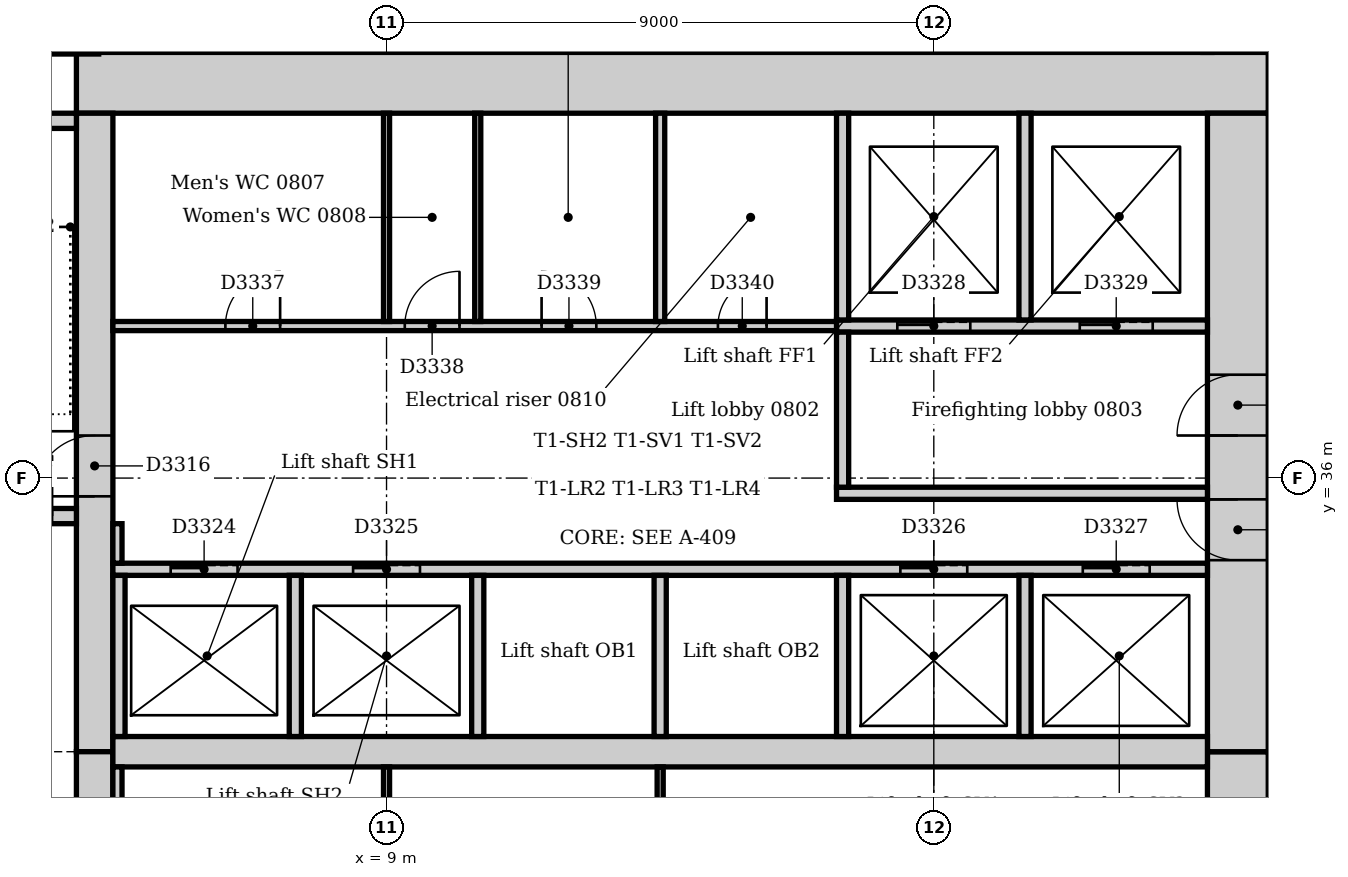
"""IFC4 building model, lengths in metres.
Left out: names, types, materials, properties, quantities, classifications, styles, units other than length and angle.
Written with IfcOpenShell. Run it as: python <this file> out.ifc"""

import sys

from ifc_helpers import new_model, si_unit, direction, frame, frame_2d, origin, origin_2d, place, context, subcontext, project, spatial, rectangle, extrude, element, fill, save


model = new_model("IFC4")
c1 = context("Model", 3, precision=1e-05, world=origin(), true_north=direction((0.0, 1.0)))
c2 = subcontext(c1, "Body", "Model", "MODEL_VIEW")
j1 = project(units=[si_unit("LENGTHUNIT", "METRE"), si_unit("PLANEANGLEUNIT", "RADIAN")], contexts=[c1])
p1 = place(None, origin())
s1 = spatial("IfcSite", under=j1, at=p1, CompositionType="ELEMENT")
p2 = place(p1, origin())
s2 = spatial("IfcBuilding", under=s1, at=p2, CompositionType="ELEMENT")
p3 = place(p2, frame((0.0, 0.0, 38.0)))
s3 = spatial("IfcBuildingStorey", under=s2, at=p3, CompositionType="ELEMENT", Elevation=38.0)
p4 = place(p3, frame((23.5, 42.5, 0.0), z_axis=(0.0, 0.0, 1.0), x_axis=(-1.0, 0.0, 0.0)))
e1 = element("IfcWall", 1, at=p4, inside=s3, PredefinedType="SOLIDWALL", context=c2, shape_type="SweptSolid", body=[
    extrude(rectangle(XDim=19.6, YDim=1.0, at=frame_2d((9.8, 0.0))), origin(), (0.0, 0.0, 1.0), 4.0),
])
p5 = place(p3, frame((23.0, 21.0, 0.0), z_axis=(0.0, 0.0, 1.0), x_axis=(0.0, 1.0, 0.0)))
e2 = element("IfcWall", 2, at=p5, inside=s3, PredefinedType="SOLIDWALL", context=c2, shape_type="SweptSolid", body=[
    extrude(rectangle(XDim=10.5, YDim=1.0, at=frame_2d((5.25, 0.0))), origin(), (0.0, 0.0, 1.0), 4.0),
])
p6 = place(p5, frame((4.35, 0.0, 0.0)))
e3 = element("IfcOpeningElement", 3, at=p6, cuts=e2, PredefinedType="OPENING", context=c2, shape_type="SweptSolid", body=[
    extrude(rectangle(XDim=1.8, YDim=2.1, at=frame_2d((0.9, 1.05))), frame((0.0, 0.51, 0.0), z_axis=(0.0, -1.0, 0.0), x_axis=(1.0, 0.0, 0.0)), (0.0, 0.0, 1.0), 1.02),
])
p7 = place(p3, frame((23.0, 31.5, 0.0), z_axis=(0.0, 0.0, 1.0), x_axis=(0.0, 1.0, 0.0)))
e4 = element("IfcWall", 4, at=p7, inside=s3, PredefinedType="SOLIDWALL", context=c2, shape_type="SweptSolid", body=[
    extrude(rectangle(XDim=10.5, YDim=1.0, at=frame_2d((5.25, 0.0))), origin(), (0.0, 0.0, 1.0), 4.0),
])
p8 = place(p7, frame((3.15, 0.0, 0.0)))
e5 = element("IfcOpeningElement", 5, at=p8, cuts=e4, PredefinedType="OPENING", context=c2, shape_type="SweptSolid", body=[
    extrude(rectangle(XDim=1.0, YDim=2.1, at=frame_2d((0.5, 1.05))), frame((0.0, 0.51, 0.0), z_axis=(0.0, -1.0, 0.0), x_axis=(1.0, 0.0, 0.0)), (0.0, 0.0, 1.0), 1.02),
])
p9 = place(p7, frame((5.2, 0.0, 0.0)))
e6 = element("IfcOpeningElement", 6, at=p9, cuts=e4, PredefinedType="OPENING", context=c2, shape_type="SweptSolid", body=[
    extrude(rectangle(XDim=1.0, YDim=2.1, at=frame_2d((0.5, 1.05))), frame((0.0, 0.51, 0.0), z_axis=(0.0, -1.0, 0.0), x_axis=(1.0, 0.0, 0.0)), (0.0, 0.0, 1.0), 1.02),
])
p10 = place(p3, frame((4.2, 42.0, 0.0), z_axis=(0.0, 0.0, 1.0), x_axis=(0.0, -1.0, 0.0)))
e7 = element("IfcWall", 7, at=p10, inside=s3, PredefinedType="SOLIDWALL", context=c2, shape_type="SweptSolid", body=[
    extrude(rectangle(XDim=10.5, YDim=0.6, at=frame_2d((5.25, 0.0))), origin(), (0.0, 0.0, 1.0), 4.0),
])
p11 = place(p10, frame((5.3, 0.0, 0.0)))
e8 = element("IfcOpeningElement", 8, at=p11, cuts=e7, PredefinedType="OPENING", context=c2, shape_type="SweptSolid", body=[
    extrude(rectangle(XDim=1.0, YDim=2.1, at=frame_2d((0.5, 1.05))), frame((0.0, 0.31, 0.0), z_axis=(0.0, -1.0, 0.0), x_axis=(1.0, 0.0, 0.0)), (0.0, 0.0, 1.0), 0.62),
])
p12 = place(p3, frame((4.2, 31.5, 0.0), z_axis=(0.0, 0.0, 1.0), x_axis=(0.0, -1.0, 0.0)))
e9 = element("IfcWall", 9, at=p12, inside=s3, PredefinedType="SOLIDWALL", context=c2, shape_type="SweptSolid", body=[
    extrude(rectangle(XDim=10.5, YDim=0.6, at=frame_2d((5.25, 0.0))), origin(), (0.0, 0.0, 1.0), 4.0),
])
p13 = place(p12, frame((4.25, 0.0, 0.0)))
e10 = element("IfcOpeningElement", 10, at=p13, cuts=e9, PredefinedType="OPENING", context=c2, shape_type="SweptSolid", body=[
    extrude(rectangle(XDim=1.0, YDim=2.1, at=frame_2d((0.5, 1.05))), frame((0.0, 0.31, 0.0), z_axis=(0.0, -1.0, 0.0), x_axis=(1.0, 0.0, 0.0)), (0.0, 0.0, 1.0), 0.62),
])
p14 = place(p3, frame((4.5, 31.5, 0.0), z_axis=(0.0, 0.0, 1.0), x_axis=(1.0, 0.0, 0.0)))
e11 = element("IfcWall", 11, at=p14, inside=s3, PredefinedType="SOLIDWALL", context=c2, shape_type="SweptSolid", body=[
    extrude(rectangle(XDim=18.0, YDim=0.5, at=frame_2d((9.0, 0.0))), origin(), (0.0, 0.0, 1.0), 4.0),
])
p15 = place(p3, frame((0.36, 35.375, 0.0), z_axis=(0.0, 0.0, 1.0), x_axis=(1.0, 0.0, 0.0)))
e12 = element("IfcWall", 12, at=p15, inside=s3, PredefinedType="SOLIDWALL", context=c2, shape_type="SweptSolid", body=[
    extrude(rectangle(XDim=3.54, YDim=0.25, at=frame_2d((1.77, 0.0))), origin(), (0.0, 0.0, 1.0), 4.0),
])
p16 = place(p15, frame((2.14, 0.0, 0.0)))
e13 = element("IfcOpeningElement", 13, at=p16, cuts=e12, PredefinedType="OPENING", context=c2, shape_type="SweptSolid", body=[
    extrude(rectangle(XDim=1.0, YDim=2.1, at=frame_2d((0.5, 1.05))), frame((0.0, 0.135, 0.0), z_axis=(0.0, -1.0, 0.0), x_axis=(1.0, 0.0, 0.0)), (0.0, 0.0, 1.0), 0.27),
])
p17 = place(p3, frame((3.9, 41.875, 0.0), z_axis=(0.0, 0.0, 1.0), x_axis=(-1.0, 0.0, 0.0)))
e14 = element("IfcWall", 14, at=p17, inside=s3, PredefinedType="SOLIDWALL", context=c2, shape_type="SweptSolid", body=[
    extrude(rectangle(XDim=3.54, YDim=0.25, at=frame_2d((1.77, 0.0))), origin(), (0.0, 0.0, 1.0), 4.0),
])
p18 = place(p3, frame((3.667, 43.574, 0.0), z_axis=(0.0, 0.0, 1.0), x_axis=(1.0, 0.0, 0.0)))
e15 = element("IfcColumn", 15, at=p18, inside=s3, PredefinedType="COLUMN", context=c2, shape_type="SweptSolid", body=[
    extrude(rectangle(XDim=1.2, YDim=1.2, at=origin_2d()), origin(), (0.0, 0.0, 1.0), 3.85),
])
p19 = place(p3, frame((16.4, 35.75, 0.0), z_axis=(0.0, 0.0, 1.0), x_axis=(1.0, 0.0, 0.0)))
e16 = element("IfcWall", 16, at=p19, inside=s3, PredefinedType="PARTITIONING", context=c2, shape_type="SweptSolid", body=[
    extrude(rectangle(XDim=6.1, YDim=0.2, at=frame_2d((3.05, 0.0))), origin(), (0.0, 0.0, 1.0), 3.85),
])
p20 = place(p3, frame((16.4, 38.5, 0.0), z_axis=(0.0, 0.0, 1.0), x_axis=(1.0, 0.0, 0.0)))
e17 = element("IfcWall", 17, at=p20, inside=s3, PredefinedType="PARTITIONING", context=c2, shape_type="SweptSolid", body=[
    extrude(rectangle(XDim=6.1, YDim=0.2, at=frame_2d((3.05, 0.0))), origin(), (0.0, 0.0, 1.0), 3.85),
])
p21 = place(p20, frame((1.0, 0.0, 0.0)))
e18 = element("IfcOpeningElement", 18, at=p21, cuts=e17, PredefinedType="OPENING", context=c2, shape_type="SweptSolid", body=[
    extrude(rectangle(XDim=1.2, YDim=2.1, at=frame_2d((0.6, 1.05))), frame((0.0, 0.11, 0.0), z_axis=(0.0, -1.0, 0.0), x_axis=(1.0, 0.0, 0.0)), (0.0, 0.0, 1.0), 0.22),
])
p22 = place(p20, frame((4.0, 0.0, 0.0)))
e19 = element("IfcOpeningElement", 19, at=p22, cuts=e17, PredefinedType="OPENING", context=c2, shape_type="SweptSolid", body=[
    extrude(rectangle(XDim=1.2, YDim=2.1, at=frame_2d((0.6, 1.05))), frame((0.0, 0.11, 0.0), z_axis=(0.0, -1.0, 0.0), x_axis=(1.0, 0.0, 0.0)), (0.0, 0.0, 1.0), 0.22),
])
p23 = place(p3, frame((16.5, 35.85, 0.0), z_axis=(0.0, 0.0, 1.0), x_axis=(0.0, 1.0, 0.0)))
e20 = element("IfcWall", 20, at=p23, inside=s3, PredefinedType="PARTITIONING", context=c2, shape_type="SweptSolid", body=[
    extrude(rectangle(XDim=2.55, YDim=0.2, at=frame_2d((1.275, 0.0))), origin(), (0.0, 0.0, 1.0), 3.85),
])
p24 = place(p3, frame((4.5, 34.5, 0.0), z_axis=(0.0, 0.0, 1.0), x_axis=(1.0, 0.0, 0.0)))
e21 = element("IfcWall", 21, at=p24, inside=s3, PredefinedType="PARTITIONING", context=c2, shape_type="SweptSolid", body=[
    extrude(rectangle(XDim=18.0, YDim=0.2, at=frame_2d((9.0, 0.0))), origin(), (0.0, 0.0, 1.0), 3.85),
])
p25 = place(p24, frame((0.95, 0.0, 0.0)))
e22 = element("IfcOpeningElement", 22, at=p25, cuts=e21, PredefinedType="OPENING", context=c2, shape_type="SweptSolid", body=[
    extrude(rectangle(XDim=1.1, YDim=2.1, at=frame_2d((0.55, 1.05))), frame((0.0, 0.11, 0.0), z_axis=(0.0, -1.0, 0.0), x_axis=(1.0, 0.0, 0.0)), (0.0, 0.0, 1.0), 0.22),
])
p26 = place(p24, frame((3.95, 0.0, 0.0)))
e23 = element("IfcOpeningElement", 23, at=p26, cuts=e21, PredefinedType="OPENING", context=c2, shape_type="SweptSolid", body=[
    extrude(rectangle(XDim=1.1, YDim=2.1, at=frame_2d((0.55, 1.05))), frame((0.0, 0.11, 0.0), z_axis=(0.0, -1.0, 0.0), x_axis=(1.0, 0.0, 0.0)), (0.0, 0.0, 1.0), 0.22),
])
p27 = place(p24, frame((12.95, 0.0, 0.0)))
e24 = element("IfcOpeningElement", 24, at=p27, cuts=e21, PredefinedType="OPENING", context=c2, shape_type="SweptSolid", body=[
    extrude(rectangle(XDim=1.1, YDim=2.1, at=frame_2d((0.55, 1.05))), frame((0.0, 0.11, 0.0), z_axis=(0.0, -1.0, 0.0), x_axis=(1.0, 0.0, 0.0)), (0.0, 0.0, 1.0), 0.22),
])
p28 = place(p24, frame((15.95, 0.0, 0.0)))
e25 = element("IfcOpeningElement", 25, at=p28, cuts=e21, PredefinedType="OPENING", context=c2, shape_type="SweptSolid", body=[
    extrude(rectangle(XDim=1.1, YDim=2.1, at=frame_2d((0.55, 1.05))), frame((0.0, 0.11, 0.0), z_axis=(0.0, -1.0, 0.0), x_axis=(1.0, 0.0, 0.0)), (0.0, 0.0, 1.0), 0.22),
])
for number, where, z_axis, x_axis in (
    (26, (16.5, 38.6, 0.0), (0.0, 0.0, 1.0), (0.0, 1.0, 0.0)),
    (27, (19.5, 38.6, 0.0), (0.0, 0.0, 1.0), (0.0, 1.0, 0.0)),
):
    element("IfcWall", number, at=place(p3, frame(where, z_axis=z_axis, x_axis=x_axis)), inside=s3, PredefinedType="PARTITIONING", context=c2, shape_type="SweptSolid", body=[
        extrude(rectangle(XDim=3.4, YDim=0.2, at=frame_2d((1.7, 0.0))), origin(), (0.0, 0.0, 1.0), 3.85),
    ])
for number, where, z_axis, x_axis in (
    (28, (4.6, 31.75, 0.0), (0.0, 0.0, 1.0), (0.0, 1.0, 0.0)),
    (29, (7.5, 31.75, 0.0), (0.0, 0.0, 1.0), (0.0, 1.0, 0.0)),
    (30, (10.5, 31.75, 0.0), (0.0, 0.0, 1.0), (0.0, 1.0, 0.0)),
    (31, (13.5, 31.75, 0.0), (0.0, 0.0, 1.0), (0.0, 1.0, 0.0)),
    (32, (16.5, 31.75, 0.0), (0.0, 0.0, 1.0), (0.0, 1.0, 0.0)),
    (33, (19.5, 31.75, 0.0), (0.0, 0.0, 1.0), (0.0, 1.0, 0.0)),
):
    element("IfcWall", number, at=place(p3, frame(where, z_axis=z_axis, x_axis=x_axis)), inside=s3, PredefinedType="PARTITIONING", context=c2, shape_type="SweptSolid", body=[
        extrude(rectangle(XDim=2.65, YDim=0.2, at=frame_2d((1.325, 0.0))), origin(), (0.0, 0.0, 1.0), 3.85),
    ])
p29 = place(p3, frame((4.5, 38.5, 0.0), z_axis=(0.0, 0.0, 1.0), x_axis=(1.0, 0.0, 0.0)))
e34 = element("IfcWall", 34, at=p29, inside=s3, PredefinedType="PARTITIONING", context=c2, shape_type="SweptSolid", body=[
    extrude(rectangle(XDim=11.9, YDim=0.15, at=frame_2d((5.95, 0.0))), origin(), (0.0, 0.0, 1.0), 3.85),
])
p30 = place(p29, frame((1.85, 0.0, 0.0)))
e35 = element("IfcOpeningElement", 35, at=p30, cuts=e34, PredefinedType="OPENING", context=c2, shape_type="SweptSolid", body=[
    extrude(rectangle(XDim=0.9, YDim=2.1, at=frame_2d((0.45, 1.05))), frame((0.0, 0.085, 0.0), z_axis=(0.0, -1.0, 0.0), x_axis=(1.0, 0.0, 0.0)), (0.0, 0.0, 1.0), 0.17),
])
p31 = place(p29, frame((4.8, 0.0, 0.0)))
e36 = element("IfcOpeningElement", 36, at=p31, cuts=e34, PredefinedType="OPENING", context=c2, shape_type="SweptSolid", body=[
    extrude(rectangle(XDim=0.9, YDim=2.1, at=frame_2d((0.45, 1.05))), frame((0.0, 0.085, 0.0), z_axis=(0.0, -1.0, 0.0), x_axis=(1.0, 0.0, 0.0)), (0.0, 0.0, 1.0), 0.17),
])
p32 = place(p29, frame((7.05, 0.0, 0.0)))
e37 = element("IfcOpeningElement", 37, at=p32, cuts=e34, PredefinedType="OPENING", context=c2, shape_type="SweptSolid", body=[
    extrude(rectangle(XDim=0.9, YDim=2.1, at=frame_2d((0.45, 1.05))), frame((0.0, 0.085, 0.0), z_axis=(0.0, -1.0, 0.0), x_axis=(1.0, 0.0, 0.0)), (0.0, 0.0, 1.0), 0.17),
])
p33 = place(p29, frame((9.95, 0.0, 0.0)))
e38 = element("IfcOpeningElement", 38, at=p33, cuts=e34, PredefinedType="OPENING", context=c2, shape_type="SweptSolid", body=[
    extrude(rectangle(XDim=0.8, YDim=2.1, at=frame_2d((0.4, 1.05))), frame((0.0, 0.085, 0.0), z_axis=(0.0, -1.0, 0.0), x_axis=(1.0, 0.0, 0.0)), (0.0, 0.0, 1.0), 0.17),
])
p34 = place(p3, frame((4.575, 28.575, 0.0), z_axis=(0.0, 0.0, 1.0), x_axis=(0.0, 1.0, 0.0)))
e39 = element("IfcWall", 39, at=p34, inside=s3, PredefinedType="PARTITIONING", context=c2, shape_type="SweptSolid", body=[
    extrude(rectangle(XDim=2.675, YDim=0.15, at=frame_2d((1.337, 0.0))), origin(), (0.0, 0.0, 1.0), 3.85),
])
p35 = place(p3, frame((4.575, 34.6, 0.0), z_axis=(0.0, 0.0, 1.0), x_axis=(0.0, 1.0, 0.0)))
e40 = element("IfcWall", 40, at=p35, inside=s3, PredefinedType="PARTITIONING", context=c2, shape_type="SweptSolid", body=[
    extrude(rectangle(XDim=0.65, YDim=0.15, at=frame_2d((0.325, 0.0))), origin(), (0.0, 0.0, 1.0), 3.85),
])
p36 = place(p3, frame((13.5, 38.575, 0.0), z_axis=(0.0, 0.0, 1.0), x_axis=(0.0, 1.0, 0.0)))
e41 = element("IfcWall", 41, at=p36, inside=s3, PredefinedType="PARTITIONING", context=c2, shape_type="SweptSolid", body=[
    extrude(rectangle(XDim=3.425, YDim=0.15, at=frame_2d((1.712, 0.0))), origin(), (0.0, 0.0, 1.0), 3.85),
])
for number, where, z_axis, x_axis in (
    (42, (9.0, 38.575, 0.0), (0.0, 0.0, 1.0), (0.0, 1.0, 0.0)),
    (43, (10.5, 38.575, 0.0), (0.0, 0.0, 1.0), (0.0, 1.0, 0.0)),
):
    element("IfcWall", number, at=place(p3, frame(where, z_axis=z_axis, x_axis=x_axis)), inside=s3, PredefinedType="PARTITIONING", context=c2, shape_type="SweptSolid", body=[
        extrude(rectangle(XDim=3.425, YDim=0.1, at=frame_2d((1.712, 0.0))), origin(), (0.0, 0.0, 1.0), 3.85),
    ])
for number, where, z_axis, x_axis in (
    (44, (9.0, 28.575, 0.0), (0.0, 0.0, 1.0), (0.0, 1.0, 0.0)),
    (45, (13.5, 28.575, 0.0), (0.0, 0.0, 1.0), (0.0, 1.0, 0.0)),
):
    element("IfcWall", number, at=place(p3, frame(where, z_axis=z_axis, x_axis=x_axis)), inside=s3, PredefinedType="PARTITIONING", context=c2, shape_type="SweptSolid", body=[
        extrude(rectangle(XDim=2.675, YDim=0.1, at=frame_2d((1.337, 0.0))), origin(), (0.0, 0.0, 1.0), 3.85),
    ])
p37 = place(p11, frame((1.0, 0.0, 0.0), z_axis=(0.0, 0.0, 1.0), x_axis=(-1.0, 0.0, 0.0)))
e46 = element("IfcDoor", 46, at=p37, inside=s3, OperationType="SINGLE_SWING_LEFT", PredefinedType="DOOR", context=c2, shape_type="SweptSolid", body=[
    extrude(rectangle(XDim=1.0, YDim=2.1, at=frame_2d((0.5, 1.05))), frame((0.0, 0.025, 0.0), z_axis=(0.0, -1.0, 0.0), x_axis=(1.0, 0.0, 0.0)), (0.0, 0.0, 1.0), 0.05),
])
fill(e8, e46)
p38 = place(p25, origin())
e47 = element("IfcDoor", 47, at=p38, inside=s3, OperationType="SLIDING_TO_LEFT", PredefinedType="DOOR", context=c2, shape_type="SweptSolid", body=[
    extrude(rectangle(XDim=1.1, YDim=2.1, at=frame_2d((0.55, 1.05))), frame((0.0, 0.025, 0.0), z_axis=(0.0, -1.0, 0.0), x_axis=(1.0, 0.0, 0.0)), (0.0, 0.0, 1.0), 0.05),
])
fill(e22, e47)
p39 = place(p26, origin())
e48 = element("IfcDoor", 48, at=p39, inside=s3, OperationType="SLIDING_TO_LEFT", PredefinedType="DOOR", context=c2, shape_type="SweptSolid", body=[
    extrude(rectangle(XDim=1.1, YDim=2.1, at=frame_2d((0.55, 1.05))), frame((0.0, 0.025, 0.0), z_axis=(0.0, -1.0, 0.0), x_axis=(1.0, 0.0, 0.0)), (0.0, 0.0, 1.0), 0.05),
])
fill(e23, e48)
p40 = place(p27, origin())
e49 = element("IfcDoor", 49, at=p40, inside=s3, OperationType="SLIDING_TO_LEFT", PredefinedType="DOOR", context=c2, shape_type="SweptSolid", body=[
    extrude(rectangle(XDim=1.1, YDim=2.1, at=frame_2d((0.55, 1.05))), frame((0.0, 0.025, 0.0), z_axis=(0.0, -1.0, 0.0), x_axis=(1.0, 0.0, 0.0)), (0.0, 0.0, 1.0), 0.05),
])
fill(e24, e49)
p41 = place(p28, origin())
e50 = element("IfcDoor", 50, at=p41, inside=s3, OperationType="SLIDING_TO_LEFT", PredefinedType="DOOR", context=c2, shape_type="SweptSolid", body=[
    extrude(rectangle(XDim=1.1, YDim=2.1, at=frame_2d((0.55, 1.05))), frame((0.0, 0.025, 0.0), z_axis=(0.0, -1.0, 0.0), x_axis=(1.0, 0.0, 0.0)), (0.0, 0.0, 1.0), 0.05),
])
fill(e25, e50)
p42 = place(p21, origin())
e51 = element("IfcDoor", 51, at=p42, inside=s3, OperationType="SLIDING_TO_LEFT", PredefinedType="DOOR", context=c2, shape_type="SweptSolid", body=[
    extrude(rectangle(XDim=1.2, YDim=2.1, at=frame_2d((0.6, 1.05))), frame((0.0, 0.025, 0.0), z_axis=(0.0, -1.0, 0.0), x_axis=(1.0, 0.0, 0.0)), (0.0, 0.0, 1.0), 0.05),
])
fill(e18, e51)
p43 = place(p22, origin())
e52 = element("IfcDoor", 52, at=p43, inside=s3, OperationType="SLIDING_TO_LEFT", PredefinedType="DOOR", context=c2, shape_type="SweptSolid", body=[
    extrude(rectangle(XDim=1.2, YDim=2.1, at=frame_2d((0.6, 1.05))), frame((0.0, 0.025, 0.0), z_axis=(0.0, -1.0, 0.0), x_axis=(1.0, 0.0, 0.0)), (0.0, 0.0, 1.0), 0.05),
])
fill(e19, e52)
p44 = place(p8, origin())
e53 = element("IfcDoor", 53, at=p44, inside=s3, OperationType="SINGLE_SWING_RIGHT", PredefinedType="DOOR", context=c2, shape_type="SweptSolid", body=[
    extrude(rectangle(XDim=1.0, YDim=2.1, at=frame_2d((0.5, 1.05))), frame((0.0, 0.025, 0.0), z_axis=(0.0, -1.0, 0.0), x_axis=(1.0, 0.0, 0.0)), (0.0, 0.0, 1.0), 0.05),
])
fill(e5, e53)
p45 = place(p9, origin())
e54 = element("IfcDoor", 54, at=p45, inside=s3, OperationType="SINGLE_SWING_LEFT", PredefinedType="DOOR", context=c2, shape_type="SweptSolid", body=[
    extrude(rectangle(XDim=1.0, YDim=2.1, at=frame_2d((0.5, 1.05))), frame((0.0, 0.025, 0.0), z_axis=(0.0, -1.0, 0.0), x_axis=(1.0, 0.0, 0.0)), (0.0, 0.0, 1.0), 0.05),
])
fill(e6, e54)
p46 = place(p30, origin())
e55 = element("IfcDoor", 55, at=p46, inside=s3, OperationType="SINGLE_SWING_RIGHT", PredefinedType="DOOR", context=c2, shape_type="SweptSolid", body=[
    extrude(rectangle(XDim=0.9, YDim=2.1, at=frame_2d((0.45, 1.05))), frame((0.0, 0.025, 0.0), z_axis=(0.0, -1.0, 0.0), x_axis=(1.0, 0.0, 0.0)), (0.0, 0.0, 1.0), 0.05),
])
fill(e35, e55)
p47 = place(p31, origin())
e56 = element("IfcDoor", 56, at=p47, inside=s3, OperationType="SINGLE_SWING_RIGHT", PredefinedType="DOOR", context=c2, shape_type="SweptSolid", body=[
    extrude(rectangle(XDim=0.9, YDim=2.1, at=frame_2d((0.45, 1.05))), frame((0.0, 0.025, 0.0), z_axis=(0.0, -1.0, 0.0), x_axis=(1.0, 0.0, 0.0)), (0.0, 0.0, 1.0), 0.05),
])
fill(e36, e56)
p48 = place(p32, origin())
e57 = element("IfcDoor", 57, at=p48, inside=s3, OperationType="SINGLE_SWING_LEFT", PredefinedType="DOOR", context=c2, shape_type="SweptSolid", body=[
    extrude(rectangle(XDim=0.9, YDim=2.1, at=frame_2d((0.45, 1.05))), frame((0.0, 0.025, 0.0), z_axis=(0.0, -1.0, 0.0), x_axis=(1.0, 0.0, 0.0)), (0.0, 0.0, 1.0), 0.05),
])
fill(e37, e57)
p49 = place(p33, origin())
e58 = element("IfcDoor", 58, at=p49, inside=s3, OperationType="SINGLE_SWING_RIGHT", PredefinedType="DOOR", context=c2, shape_type="SweptSolid", body=[
    extrude(rectangle(XDim=0.8, YDim=2.1, at=frame_2d((0.4, 1.05))), frame((0.0, 0.025, 0.0), z_axis=(0.0, -1.0, 0.0), x_axis=(1.0, 0.0, 0.0)), (0.0, 0.0, 1.0), 0.05),
])
fill(e38, e58)
save(model, sys.argv[1])
